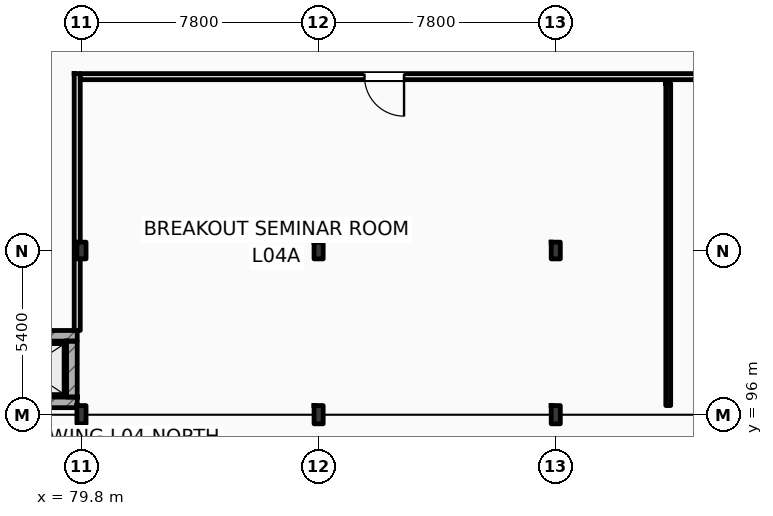
"""IFC4 building model, lengths in metres.
Left out: names, types, materials, properties, quantities, classifications, styles, units other than length and angle.
Written with IfcOpenShell. Run it as: python <this file> out.ifc"""

import sys

from ifc_helpers import new_model, si_unit, direction, frame, frame_2d, origin, origin_2d, place, context, subcontext, project, spatial, rectangle, i_section, extrude, element, fill, save


model = new_model("IFC4")
c1 = context("Model", 3, precision=1e-05, world=origin(), true_north=direction((0.0, 1.0)))
c2 = subcontext(c1, "Body", "Model", "MODEL_VIEW")
j1 = project(units=[si_unit("LENGTHUNIT", "METRE"), si_unit("PLANEANGLEUNIT", "RADIAN")], contexts=[c1])
p1 = place(None, origin())
s1 = spatial("IfcSite", under=j1, at=p1, CompositionType="ELEMENT")
p2 = place(p1, origin())
s2 = spatial("IfcBuilding", under=s1, at=p2, CompositionType="ELEMENT")
p3 = place(p2, frame((0.0, 0.0, 20.4)))
s3 = spatial("IfcBuildingStorey", under=s2, at=p3, CompositionType="ELEMENT", Elevation=20.4)
p4 = place(p3, frame((79.8, 96.0, 0.0), z_axis=(0.0, 0.0, 1.0), x_axis=(1.0, 0.0, 0.0)))
e1 = element("IfcColumn", 1, at=p4, inside=s3, PredefinedType="COLUMN", context=c2, shape_type="SweptSolid", body=[
    extrude(i_section(OverallWidth=0.3, OverallDepth=0.6, WebThickness=0.015, FlangeThickness=0.03, FilletRadius=0.027, at=origin_2d()), origin(), (0.0, 0.0, 1.0), 4.2),
])
p5 = place(p3, frame((79.8, 101.4, 0.0), z_axis=(0.0, 0.0, 1.0), x_axis=(1.0, 0.0, 0.0)))
e2 = element("IfcColumn", 2, at=p5, inside=s3, PredefinedType="COLUMN", context=c2, shape_type="SweptSolid", body=[
    extrude(i_section(OverallWidth=0.3, OverallDepth=0.55, WebThickness=0.015, FlangeThickness=0.029, FilletRadius=0.027, at=origin_2d()), origin(), (0.0, 0.0, 1.0), 4.2),
])
p6 = place(p3, frame((87.6, 96.0, 0.0), z_axis=(0.0, 0.0, 1.0), x_axis=(1.0, 0.0, 0.0)))
e3 = element("IfcColumn", 3, at=p6, inside=s3, PredefinedType="COLUMN", context=c2, shape_type="SweptSolid", body=[
    extrude(i_section(OverallWidth=0.3, OverallDepth=0.6, WebThickness=0.015, FlangeThickness=0.03, FilletRadius=0.027, at=origin_2d()), origin(), (0.0, 0.0, 1.0), 4.2),
])
p7 = place(p3, frame((87.6, 101.4, 0.0), z_axis=(0.0, 0.0, 1.0), x_axis=(1.0, 0.0, 0.0)))
e4 = element("IfcColumn", 4, at=p7, inside=s3, PredefinedType="COLUMN", context=c2, shape_type="SweptSolid", body=[
    extrude(i_section(OverallWidth=0.3, OverallDepth=0.55, WebThickness=0.015, FlangeThickness=0.029, FilletRadius=0.027, at=origin_2d()), origin(), (0.0, 0.0, 1.0), 4.2),
])
p8 = place(p3, frame((95.4, 96.0, 0.0), z_axis=(0.0, 0.0, 1.0), x_axis=(1.0, 0.0, 0.0)))
e5 = element("IfcColumn", 5, at=p8, inside=s3, PredefinedType="COLUMN", context=c2, shape_type="SweptSolid", body=[
    extrude(i_section(OverallWidth=0.3, OverallDepth=0.6, WebThickness=0.015, FlangeThickness=0.03, FilletRadius=0.027, at=origin_2d()), origin(), (0.0, 0.0, 1.0), 4.2),
])
p9 = place(p3, frame((95.4, 101.4, 0.0), z_axis=(0.0, 0.0, 1.0), x_axis=(1.0, 0.0, 0.0)))
e6 = element("IfcColumn", 6, at=p9, inside=s3, PredefinedType="COLUMN", context=c2, shape_type="SweptSolid", body=[
    extrude(i_section(OverallWidth=0.3, OverallDepth=0.55, WebThickness=0.015, FlangeThickness=0.029, FilletRadius=0.027, at=origin_2d()), origin(), (0.0, 0.0, 1.0), 4.2),
])
p10 = place(p3, frame((76.67, 98.595, 0.0), z_axis=(0.0, 0.0, 1.0), x_axis=(1.0, 0.0, 0.0)))
e7 = element("IfcWall", 7, at=p10, inside=s3, PredefinedType="SHEAR", context=c2, shape_type="SweptSolid", body=[
    extrude(rectangle(XDim=2.99, YDim=0.35, at=frame_2d((1.495, 0.0))), origin(), (0.0, 0.0, 1.0), 3.94),
])
p11 = place(p10, frame((0.695, 0.0, 0.0)))
e8 = element("IfcOpeningElement", 8, at=p11, cuts=e7, PredefinedType="OPENING", context=c2, shape_type="SweptSolid", body=[
    extrude(rectangle(XDim=1.25, YDim=2.25, at=frame_2d((0.625, 1.125))), frame((0.0, 0.185, 0.0), z_axis=(0.0, -1.0, 0.0), x_axis=(1.0, 0.0, 0.0)), (0.0, 0.0, 1.0), 0.37),
])
p12 = place(p3, frame((76.67, 96.405, 0.0), z_axis=(0.0, 0.0, 1.0), x_axis=(1.0, 0.0, 0.0)))
e9 = element("IfcWall", 9, at=p12, inside=s3, PredefinedType="SHEAR", context=c2, shape_type="SweptSolid", body=[
    extrude(rectangle(XDim=2.99, YDim=0.35, at=frame_2d((1.495, 0.0))), origin(), (0.0, 0.0, 1.0), 3.94),
])
p13 = place(p3, frame((79.485, 96.58, 0.0), z_axis=(0.0, 0.0, 1.0), x_axis=(0.0, 1.0, 0.0)))
e10 = element("IfcWall", 10, at=p13, inside=s3, PredefinedType="SHEAR", context=c2, shape_type="SweptSolid", body=[
    extrude(rectangle(XDim=1.84, YDim=0.35, at=frame_2d((0.92, 0.0))), origin(), (0.0, 0.0, 1.0), 3.53),
])
p14 = place(p3, frame((79.76, 107.12, 0.0), z_axis=(0.0, 0.0, 1.0), x_axis=(1.0, 0.0, 0.0)))
e11 = element("IfcWall", 11, at=p14, inside=s3, PredefinedType="PARTITIONING", context=c2, shape_type="SweptSolid", body=[
    extrude(rectangle(XDim=40.1, YDim=0.2, at=frame_2d((20.05, 0.0))), origin(), (0.0, 0.0, 1.0), 3.94),
])
p15 = place(p14, frame((9.35, 0.0, 0.0)))
e12 = element("IfcOpeningElement", 12, at=p15, cuts=e11, PredefinedType="OPENING", context=c2, shape_type="SweptSolid", body=[
    extrude(rectangle(XDim=1.3, YDim=2.2, at=frame_2d((0.65, 1.1))), frame((0.0, 0.11, 0.0), z_axis=(0.0, -1.0, 0.0), x_axis=(1.0, 0.0, 0.0)), (0.0, 0.0, 1.0), 0.22),
])
p16 = place(p14, frame((28.85, 0.0, 0.0)))
e13 = element("IfcOpeningElement", 13, at=p16, cuts=e11, PredefinedType="OPENING", context=c2, shape_type="SweptSolid", body=[
    extrude(rectangle(XDim=1.3, YDim=2.2, at=frame_2d((0.65, 1.1))), frame((0.0, 0.11, 0.0), z_axis=(0.0, -1.0, 0.0), x_axis=(1.0, 0.0, 0.0)), (0.0, 0.0, 1.0), 0.22),
])
p17 = place(p3, frame((79.66, 98.77, 0.0), z_axis=(0.0, 0.0, 1.0), x_axis=(0.0, 1.0, 0.0)))
e14 = element("IfcWall", 14, at=p17, inside=s3, PredefinedType="PARTITIONING", context=c2, shape_type="SweptSolid", body=[
    extrude(rectangle(XDim=8.45, YDim=0.2, at=frame_2d((4.225, 0.0))), origin(), (0.0, 0.0, 1.0), 3.53),
])
p18 = place(p3, frame((99.1, 96.3, 0.0), z_axis=(0.0, 0.0, 1.0), x_axis=(0.0, 1.0, 0.0)))
e15 = element("IfcWall", 15, at=p18, inside=s3, PredefinedType="PARTITIONING", context=c2, shape_type="SweptSolid", body=[
    extrude(rectangle(XDim=10.6, YDim=0.16, at=frame_2d((5.3, 0.0))), origin(), (0.0, 0.0, 1.0), 3.94),
])
p19 = place(p15, frame((1.3, 0.0, 0.0), z_axis=(0.0, 0.0, 1.0), x_axis=(-1.0, 0.0, 0.0)))
e16 = element("IfcDoor", 16, at=p19, inside=s3, OperationType="SINGLE_SWING_RIGHT", PredefinedType="DOOR", context=c2, shape_type="SweptSolid", body=[
    extrude(rectangle(XDim=1.3, YDim=2.2, at=frame_2d((0.65, 1.1))), frame((0.0, 0.025, 0.0), z_axis=(0.0, -1.0, 0.0), x_axis=(1.0, 0.0, 0.0)), (0.0, 0.0, 1.0), 0.05),
])
fill(e12, e16)
save(model, sys.argv[1])
